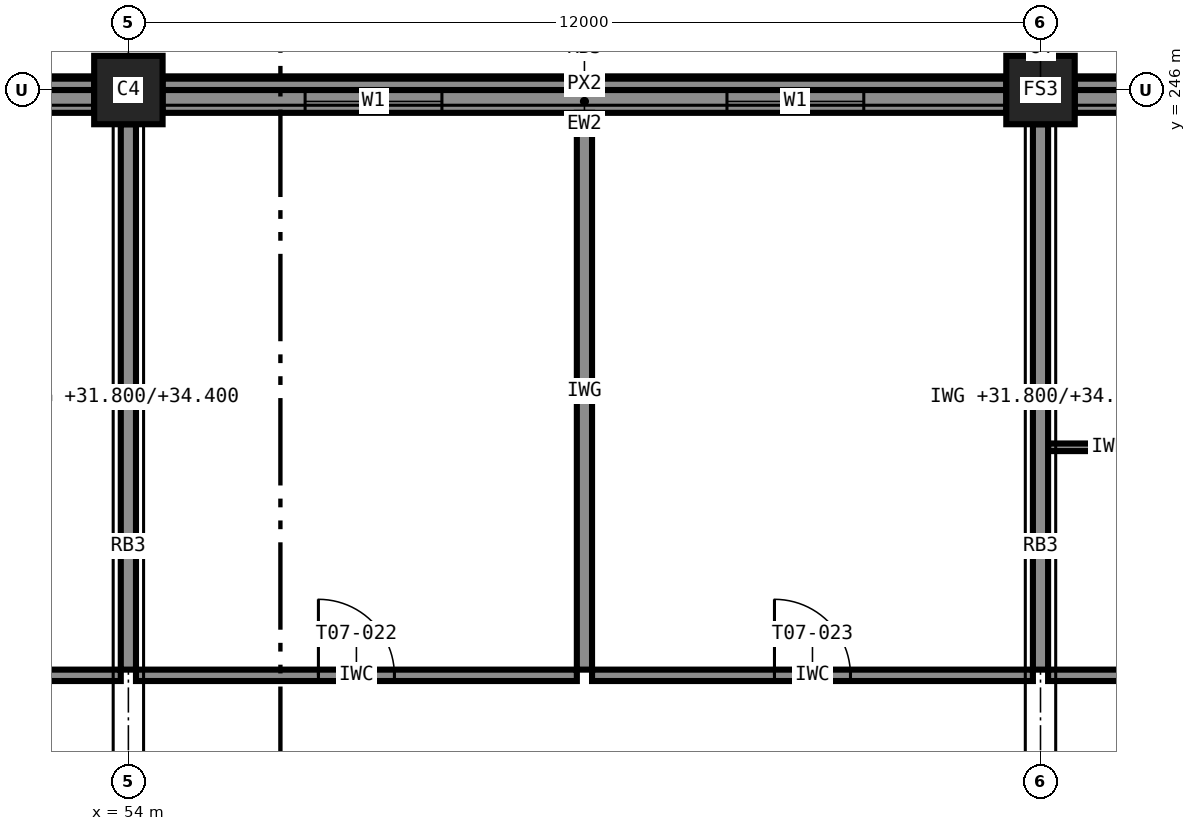
"""IFC4 building model, lengths in metres.
Left out: names, types, materials, properties, quantities, classifications, styles, units other than length and angle.
Written with IfcOpenShell. Run it as: python <this file> out.ifc"""

import sys

from ifc_helpers import new_model, si_unit, direction, frame, frame_2d, origin, origin_2d, place, context, subcontext, project, spatial, rectangle, extrude, element, fill, save


model = new_model("IFC4")
c1 = context("Model", 3, precision=1e-05, world=origin(), true_north=direction((0.0, 1.0)))
c2 = subcontext(c1, "Body", "Model", "MODEL_VIEW")
j1 = project(units=[si_unit("LENGTHUNIT", "METRE"), si_unit("PLANEANGLEUNIT", "RADIAN")], contexts=[c1])
p1 = place(None, origin())
s1 = spatial("IfcSite", under=j1, at=p1, CompositionType="ELEMENT")
p2 = place(p1, origin())
s2 = spatial("IfcBuilding", under=s1, at=p2, CompositionType="ELEMENT")
p3 = place(p2, frame((0.0, 0.0, 31.8)))
s3 = spatial("IfcBuildingStorey", under=s2, at=p3, CompositionType="ELEMENT", Elevation=31.8)
for number, where, z_axis, x_axis in (
    (1, (54.0, 246.0, 0.0), (0.0, 0.0, 1.0), (1.0, 0.0, 0.0)),
    (2, (66.0, 246.0, 0.0), (0.0, 0.0, 1.0), (1.0, 0.0, 0.0)),
):
    element("IfcColumn", number, at=place(p3, frame(where, z_axis=z_axis, x_axis=x_axis)), inside=s3, PredefinedType="COLUMN", context=c2, shape_type="SweptSolid", body=[
        extrude(rectangle(XDim=0.9, YDim=0.9, at=origin_2d()), origin(), (0.0, 0.0, 1.0), 3.6),
    ])
p4 = place(p3, frame((77.55, 245.85, 0.0), z_axis=(0.0, 0.0, 1.0), x_axis=(-1.0, 0.0, 0.0)))
e3 = element("IfcWall", 3, at=p4, inside=s3, PredefinedType="STANDARD", context=c2, shape_type="SweptSolid", body=[
    extrude(rectangle(XDim=11.1, YDim=0.3, at=frame_2d((5.55, 0.0))), origin(), (0.0, 0.0, 1.0), 2.6),
])
p5 = place(p4, frame((8.425, 0.0, 0.85)))
e4 = element("IfcOpeningElement", 4, at=p5, cuts=e3, PredefinedType="OPENING", context=c2, shape_type="SweptSolid", body=[
    extrude(rectangle(XDim=1.8, YDim=1.75, at=frame_2d((0.9, 0.875))), frame((0.0, 0.16, 0.0), z_axis=(0.0, -1.0, 0.0), x_axis=(1.0, 0.0, 0.0)), (0.0, 0.0, 1.0), 0.32),
])
p6 = place(p4, frame((4.65, 0.0, 0.85)))
e5 = element("IfcOpeningElement", 5, at=p6, cuts=e3, PredefinedType="OPENING", context=c2, shape_type="SweptSolid", body=[
    extrude(rectangle(XDim=1.8, YDim=1.75, at=frame_2d((0.9, 0.875))), frame((0.0, 0.16, 0.0), z_axis=(0.0, -1.0, 0.0), x_axis=(1.0, 0.0, 0.0)), (0.0, 0.0, 1.0), 0.32),
])
p7 = place(p4, frame((0.875, 0.0, 0.85)))
e6 = element("IfcOpeningElement", 6, at=p7, cuts=e3, PredefinedType="OPENING", context=c2, shape_type="SweptSolid", body=[
    extrude(rectangle(XDim=1.8, YDim=1.75, at=frame_2d((0.9, 0.875))), frame((0.0, 0.16, 0.0), z_axis=(0.0, -1.0, 0.0), x_axis=(1.0, 0.0, 0.0)), (0.0, 0.0, 1.0), 0.32),
])
p8 = place(p3, frame((65.55, 245.85, 0.0), z_axis=(0.0, 0.0, 1.0), x_axis=(-1.0, 0.0, 0.0)))
e7 = element("IfcWall", 7, at=p8, inside=s3, PredefinedType="STANDARD", context=c2, shape_type="SweptSolid", body=[
    extrude(rectangle(XDim=11.1, YDim=0.3, at=frame_2d((5.55, 0.0))), origin(), (0.0, 0.0, 1.0), 2.6),
])
p9 = place(p8, frame((7.425, 0.0, 0.85)))
e8 = element("IfcOpeningElement", 8, at=p9, cuts=e7, PredefinedType="OPENING", context=c2, shape_type="SweptSolid", body=[
    extrude(rectangle(XDim=1.8, YDim=1.75, at=frame_2d((0.9, 0.875))), frame((0.0, 0.16, 0.0), z_axis=(0.0, -1.0, 0.0), x_axis=(1.0, 0.0, 0.0)), (0.0, 0.0, 1.0), 0.32),
])
p10 = place(p8, frame((1.875, 0.0, 0.85)))
e9 = element("IfcOpeningElement", 9, at=p10, cuts=e7, PredefinedType="OPENING", context=c2, shape_type="SweptSolid", body=[
    extrude(rectangle(XDim=1.8, YDim=1.75, at=frame_2d((0.9, 0.875))), frame((0.0, 0.16, 0.0), z_axis=(0.0, -1.0, 0.0), x_axis=(1.0, 0.0, 0.0)), (0.0, 0.0, 1.0), 0.32),
])
p11 = place(p3, frame((53.55, 245.85, 0.0), z_axis=(0.0, 0.0, 1.0), x_axis=(-1.0, 0.0, 0.0)))
e10 = element("IfcWall", 10, at=p11, inside=s3, PredefinedType="STANDARD", context=c2, shape_type="SweptSolid", body=[
    extrude(rectangle(XDim=11.1, YDim=0.3, at=frame_2d((5.55, 0.0))), origin(), (0.0, 0.0, 1.0), 2.6),
])
p12 = place(p11, frame((0.988, 0.0, 0.85)))
e11 = element("IfcOpeningElement", 11, at=p12, cuts=e10, PredefinedType="OPENING", context=c2, shape_type="SweptSolid", body=[
    extrude(rectangle(XDim=1.8, YDim=1.75, at=frame_2d((0.9, 0.875))), frame((0.0, 0.16, 0.0), z_axis=(0.0, -1.0, 0.0), x_axis=(1.0, 0.0, 0.0)), (0.0, 0.0, 1.0), 0.32),
])
p13 = place(p11, frame((4.762, 0.0, 0.85)))
e12 = element("IfcOpeningElement", 12, at=p13, cuts=e10, PredefinedType="OPENING", context=c2, shape_type="SweptSolid", body=[
    extrude(rectangle(XDim=1.8, YDim=1.75, at=frame_2d((0.9, 0.875))), frame((0.0, 0.16, 0.0), z_axis=(0.0, -1.0, 0.0), x_axis=(1.0, 0.0, 0.0)), (0.0, 0.0, 1.0), 0.32),
])
for number, where, z_axis, x_axis in (
    (13, (77.55, 246.075, 3.4), (0.0, 0.0, 1.0), (-1.0, 0.0, 0.0)),
    (14, (65.55, 246.075, 3.4), (0.0, 0.0, 1.0), (-1.0, 0.0, 0.0)),
    (15, (53.55, 246.075, 3.4), (0.0, 0.0, 1.0), (-1.0, 0.0, 0.0)),
):
    element("IfcWall", number, at=place(p3, frame(where, z_axis=z_axis, x_axis=x_axis)), inside=s3, PredefinedType="STANDARD", context=c2, shape_type="SweptSolid", body=[
        extrude(rectangle(XDim=11.1, YDim=0.15, at=frame_2d((5.55, 0.0))), origin(), (0.0, 0.0, 1.0), 0.2),
    ])
p14 = place(p3, frame((46.0, 238.3, 0.0), z_axis=(0.0, 0.0, 1.0), x_axis=(1.0, 0.0, 0.0)))
e16 = element("IfcWall", 16, at=p14, inside=s3, PredefinedType="PARTITIONING", context=c2, shape_type="SweptSolid", body=[
    extrude(rectangle(XDim=7.9, YDim=0.15, at=frame_2d((3.95, 0.0))), origin(), (0.0, 0.0, 1.0), 3.4),
])
p15 = place(p14, frame((3.5, 0.0, 0.0)))
e17 = element("IfcOpeningElement", 17, at=p15, cuts=e16, PredefinedType="OPENING", context=c2, shape_type="SweptSolid", body=[
    extrude(rectangle(XDim=1.0, YDim=2.1, at=frame_2d((0.5, 1.05))), frame((0.0, 0.085, 0.0), z_axis=(0.0, -1.0, 0.0), x_axis=(1.0, 0.0, 0.0)), (0.0, 0.0, 1.0), 0.17),
])
p16 = place(p3, frame((54.1, 238.3, 0.0), z_axis=(0.0, 0.0, 1.0), x_axis=(1.0, 0.0, 0.0)))
e18 = element("IfcWall", 18, at=p16, inside=s3, PredefinedType="PARTITIONING", context=c2, shape_type="SweptSolid", body=[
    extrude(rectangle(XDim=5.8, YDim=0.15, at=frame_2d((2.9, 0.0))), origin(), (0.0, 0.0, 1.0), 3.4),
])
p17 = place(p16, frame((2.4, 0.0, 0.0)))
e19 = element("IfcOpeningElement", 19, at=p17, cuts=e18, PredefinedType="OPENING", context=c2, shape_type="SweptSolid", body=[
    extrude(rectangle(XDim=1.0, YDim=2.1, at=frame_2d((0.5, 1.05))), frame((0.0, 0.085, 0.0), z_axis=(0.0, -1.0, 0.0), x_axis=(1.0, 0.0, 0.0)), (0.0, 0.0, 1.0), 0.17),
])
p18 = place(p3, frame((60.1, 238.3, 0.0), z_axis=(0.0, 0.0, 1.0), x_axis=(1.0, 0.0, 0.0)))
e20 = element("IfcWall", 20, at=p18, inside=s3, PredefinedType="PARTITIONING", context=c2, shape_type="SweptSolid", body=[
    extrude(rectangle(XDim=5.8, YDim=0.15, at=frame_2d((2.9, 0.0))), origin(), (0.0, 0.0, 1.0), 3.4),
])
p19 = place(p18, frame((2.4, 0.0, 0.0)))
e21 = element("IfcOpeningElement", 21, at=p19, cuts=e20, PredefinedType="OPENING", context=c2, shape_type="SweptSolid", body=[
    extrude(rectangle(XDim=1.0, YDim=2.1, at=frame_2d((0.5, 1.05))), frame((0.0, 0.085, 0.0), z_axis=(0.0, -1.0, 0.0), x_axis=(1.0, 0.0, 0.0)), (0.0, 0.0, 1.0), 0.17),
])
p20 = place(p3, frame((66.1, 238.3, 0.0), z_axis=(0.0, 0.0, 1.0), x_axis=(1.0, 0.0, 0.0)))
e22 = element("IfcWall", 22, at=p20, inside=s3, PredefinedType="PARTITIONING", context=c2, shape_type="SweptSolid", body=[
    extrude(rectangle(XDim=3.8, YDim=0.15, at=frame_2d((1.9, 0.0))), origin(), (0.0, 0.0, 1.0), 3.4),
])
p21 = place(p20, frame((2.25, 0.0, 0.0)))
e23 = element("IfcOpeningElement", 23, at=p21, cuts=e22, PredefinedType="OPENING", context=c2, shape_type="SweptSolid", body=[
    extrude(rectangle(XDim=1.0, YDim=2.1, at=frame_2d((0.5, 1.05))), frame((0.0, 0.085, 0.0), z_axis=(0.0, -1.0, 0.0), x_axis=(1.0, 0.0, 0.0)), (0.0, 0.0, 1.0), 0.17),
])
p22 = place(p3, frame((66.1, 241.3, 0.0), z_axis=(0.0, 0.0, 1.0), x_axis=(1.0, 0.0, 0.0)))
e24 = element("IfcWall", 24, at=p22, inside=s3, PredefinedType="PARTITIONING", context=c2, shape_type="SweptSolid", body=[
    extrude(rectangle(XDim=1.6, YDim=0.1, at=frame_2d((0.8, 0.0))), origin(), (0.0, 0.0, 1.0), 3.4),
])
p23 = place(p3, frame((54.0, 245.55, 0.0), z_axis=(0.0, 0.0, 1.0), x_axis=(0.0, -1.0, 0.0)))
e25 = element("IfcWall", 25, at=p23, inside=s3, PredefinedType="PARTITIONING", context=c2, shape_type="SweptSolid", body=[
    extrude(rectangle(XDim=7.175, YDim=0.2, at=frame_2d((3.587, 0.0))), origin(), (0.0, 0.0, 1.0), 2.6),
])
p24 = place(p3, frame((60.0, 245.7, 0.0), z_axis=(0.0, 0.0, 1.0), x_axis=(0.0, -1.0, 0.0)))
e26 = element("IfcWall", 26, at=p24, inside=s3, PredefinedType="PARTITIONING", context=c2, shape_type="SweptSolid", body=[
    extrude(rectangle(XDim=7.325, YDim=0.2, at=frame_2d((3.663, 0.0))), origin(), (0.0, 0.0, 1.0), 3.4),
])
p25 = place(p3, frame((66.0, 245.55, 0.0), z_axis=(0.0, 0.0, 1.0), x_axis=(0.0, -1.0, 0.0)))
e27 = element("IfcWall", 27, at=p25, inside=s3, PredefinedType="PARTITIONING", context=c2, shape_type="SweptSolid", body=[
    extrude(rectangle(XDim=7.175, YDim=0.2, at=frame_2d((3.587, 0.0))), origin(), (0.0, 0.0, 1.0), 2.6),
])
p26 = place(p9, origin())
e28 = element("IfcWindow", 28, at=p26, inside=s3, PartitioningType="SINGLE_PANEL", PredefinedType="WINDOW", context=c2, shape_type="SweptSolid", body=[
    extrude(rectangle(XDim=1.8, YDim=1.75, at=frame_2d((0.9, 0.875))), frame((0.0, 0.03, 0.0), z_axis=(0.0, -1.0, 0.0), x_axis=(1.0, 0.0, 0.0)), (0.0, 0.0, 1.0), 0.06),
])
fill(e8, e28)
p27 = place(p10, origin())
e29 = element("IfcWindow", 29, at=p27, inside=s3, PartitioningType="SINGLE_PANEL", PredefinedType="WINDOW", context=c2, shape_type="SweptSolid", body=[
    extrude(rectangle(XDim=1.8, YDim=1.75, at=frame_2d((0.9, 0.875))), frame((0.0, 0.03, 0.0), z_axis=(0.0, -1.0, 0.0), x_axis=(1.0, 0.0, 0.0)), (0.0, 0.0, 1.0), 0.06),
])
fill(e9, e29)
p28 = place(p17, origin())
e30 = element("IfcDoor", 30, at=p28, inside=s3, OperationType="SINGLE_SWING_LEFT", PredefinedType="DOOR", context=c2, shape_type="SweptSolid", body=[
    extrude(rectangle(XDim=1.0, YDim=2.1, at=frame_2d((0.5, 1.05))), frame((0.0, 0.025, 0.0), z_axis=(0.0, -1.0, 0.0), x_axis=(1.0, 0.0, 0.0)), (0.0, 0.0, 1.0), 0.05),
])
fill(e19, e30)
p29 = place(p19, origin())
e31 = element("IfcDoor", 31, at=p29, inside=s3, OperationType="SINGLE_SWING_LEFT", PredefinedType="DOOR", context=c2, shape_type="SweptSolid", body=[
    extrude(rectangle(XDim=1.0, YDim=2.1, at=frame_2d((0.5, 1.05))), frame((0.0, 0.025, 0.0), z_axis=(0.0, -1.0, 0.0), x_axis=(1.0, 0.0, 0.0)), (0.0, 0.0, 1.0), 0.05),
])
fill(e21, e31)
save(model, sys.argv[1])
